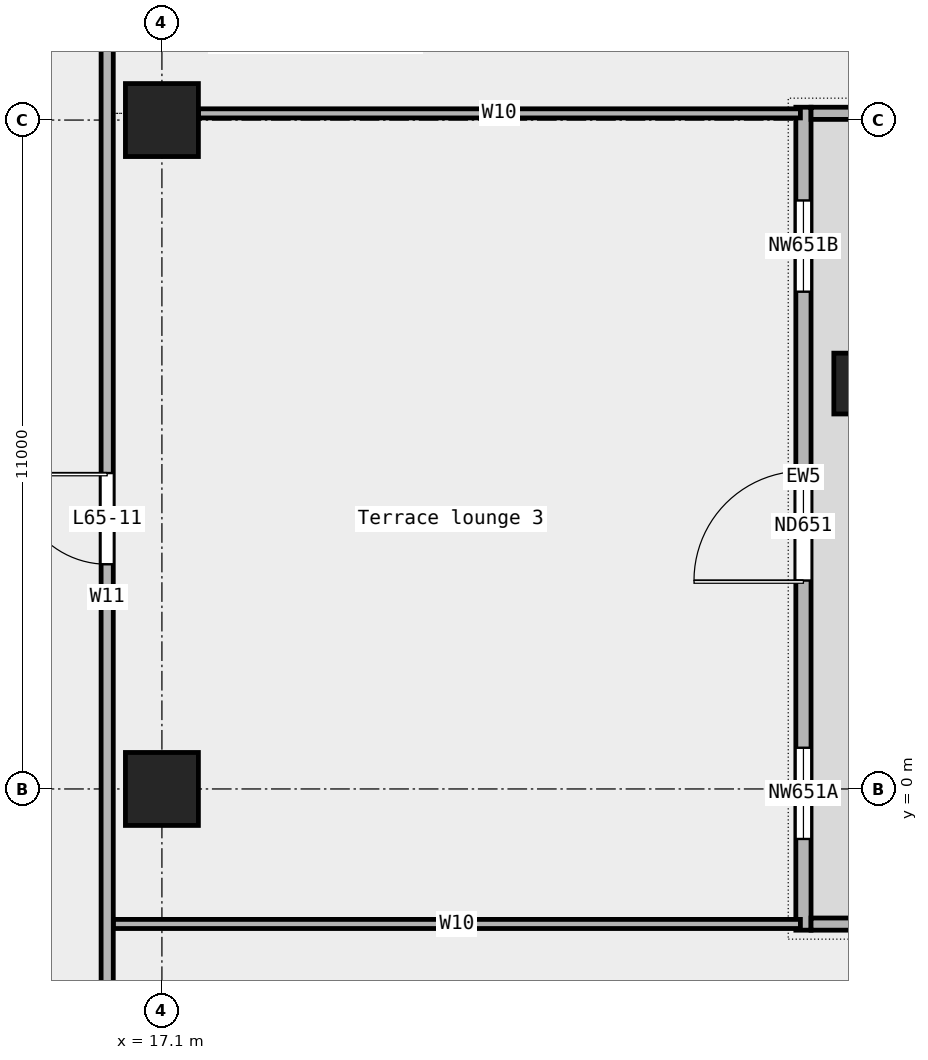
"""IFC4 building model, lengths in metres.
Left out: names, types, materials, properties, quantities, classifications, styles, units other than length and angle.
Written with IfcOpenShell. Run it as: python <this file> out.ifc"""

import sys

from ifc_helpers import new_model, si_unit, direction, frame, frame_2d, origin, origin_2d, place, context, subcontext, project, spatial, rectangle, extrude, element, fill, save


model = new_model("IFC4")
c1 = context("Model", 3, precision=1e-05, world=origin(), true_north=direction((0.0, 1.0)))
c2 = subcontext(c1, "Body", "Model", "MODEL_VIEW")
j1 = project(units=[si_unit("LENGTHUNIT", "METRE"), si_unit("PLANEANGLEUNIT", "RADIAN")], contexts=[c1])
p1 = place(None, origin())
s1 = spatial("IfcSite", under=j1, at=p1, CompositionType="ELEMENT")
p2 = place(p1, origin())
s2 = spatial("IfcBuilding", under=s1, at=p2, CompositionType="ELEMENT")
p3 = place(p2, frame((0.0, 0.0, 299.4)))
s3 = spatial("IfcBuildingStorey", under=s2, at=p3, CompositionType="ELEMENT", Elevation=299.4)
p4 = place(p3, frame((28.65, 6.667, 0.0), z_axis=(0.0, 0.0, 1.0), x_axis=(1.0, 0.0, 0.0)))
e1 = element("IfcColumn", 1, at=p4, inside=s3, PredefinedType="COLUMN", context=c2, shape_type="SweptSolid", body=[
    extrude(rectangle(XDim=1.0, YDim=1.0, at=origin_2d()), origin(), (0.0, 0.0, 1.0), 3.6),
])
for number, where, z_axis, x_axis in (
    (2, (17.1, 0.0, 0.0), (0.0, 0.0, 1.0), (1.0, 0.0, 0.0)),
    (3, (17.1, 11.0, 0.0), (0.0, 0.0, 1.0), (1.0, 0.0, 0.0)),
):
    element("IfcColumn", number, at=place(p3, frame(where, z_axis=z_axis, x_axis=x_axis)), inside=s3, PredefinedType="COLUMN", context=c2, shape_type="SweptSolid", body=[
        extrude(rectangle(XDim=1.2, YDim=1.2, at=origin_2d()), origin(), (0.0, 0.0, 1.0), 3.6),
    ])
p5 = place(p3, frame((27.65, -2.322, 0.0), z_axis=(0.0, 0.0, 1.0), x_axis=(0.0, 1.0, 0.0)))
e4 = element("IfcWall", 4, at=p5, inside=s3, PredefinedType="STANDARD", context=c2, shape_type="SweptSolid", body=[
    extrude(rectangle(XDim=13.533, YDim=0.25, at=frame_2d((6.767, 0.0))), origin(), (0.0, 0.0, 1.0), 3.6),
])
p6 = place(p5, frame((1.5, 0.0, 0.45)))
e5 = element("IfcOpeningElement", 5, at=p6, cuts=e4, PredefinedType="OPENING", context=c2, shape_type="SweptSolid", body=[
    extrude(rectangle(XDim=1.5, YDim=2.4, at=frame_2d((0.75, 1.2))), frame((0.0, 0.137, 0.0), z_axis=(0.0, -1.0, 0.0), x_axis=(1.0, 0.0, 0.0)), (0.0, 0.0, 1.0), 0.274),
])
p7 = place(p5, frame((5.75, 0.0, 0.0)))
e6 = element("IfcOpeningElement", 6, at=p7, cuts=e4, PredefinedType="OPENING", context=c2, shape_type="SweptSolid", body=[
    extrude(rectangle(XDim=1.8, YDim=2.4, at=frame_2d((0.9, 1.2))), frame((0.0, 0.137, 0.0), z_axis=(0.0, -1.0, 0.0), x_axis=(1.0, 0.0, 0.0)), (0.0, 0.0, 1.0), 0.274),
])
p8 = place(p5, frame((10.5, 0.0, 0.45)))
e7 = element("IfcOpeningElement", 7, at=p8, cuts=e4, PredefinedType="OPENING", context=c2, shape_type="SweptSolid", body=[
    extrude(rectangle(XDim=1.5, YDim=2.4, at=frame_2d((0.75, 1.2))), frame((0.0, 0.137, 0.0), z_axis=(0.0, -1.0, 0.0), x_axis=(1.0, 0.0, 0.0)), (0.0, 0.0, 1.0), 0.274),
])
for number, where, z_axis, x_axis in (
    (8, (29.65, -2.222, 0.0), (0.0, 0.0, 1.0), (-1.0, 0.0, 0.0)),
    (9, (29.65, 11.111, 0.0), (0.0, 0.0, 1.0), (-1.0, 0.0, 0.0)),
):
    element("IfcWall", number, at=place(p3, frame(where, z_axis=z_axis, x_axis=x_axis)), inside=s3, PredefinedType="STANDARD", context=c2, shape_type="SweptSolid", body=[
        extrude(rectangle(XDim=1.875, YDim=0.2, at=frame_2d((0.938, 0.0))), origin(), (0.0, 0.0, 1.0), 3.6),
    ])
p9 = place(p3, frame((16.3, -2.22, 0.0), z_axis=(0.0, 0.0, 1.0), x_axis=(1.0, 0.0, 0.0)))
e10 = element("IfcWall", 10, at=p9, inside=s3, PredefinedType="PARTITIONING", context=c2, shape_type="SweptSolid", body=[
    extrude(rectangle(XDim=11.3, YDim=0.15, at=frame_2d((5.65, 0.0))), origin(), (0.0, 0.0, 1.0), 3.6),
])
p10 = place(p3, frame((17.7, 11.11, 0.0), z_axis=(0.0, 0.0, 1.0), x_axis=(1.0, 0.0, 0.0)))
e11 = element("IfcWall", 11, at=p10, inside=s3, PredefinedType="PARTITIONING", context=c2, shape_type="SweptSolid", body=[
    extrude(rectangle(XDim=9.9, YDim=0.15, at=frame_2d((4.95, 0.0))), origin(), (0.0, 0.0, 1.0), 3.6),
])
p11 = place(p3, frame((16.2, -7.1, 0.0), z_axis=(0.0, 0.0, 1.0), x_axis=(0.0, 1.0, 0.0)))
e12 = element("IfcWall", 12, at=p11, inside=s3, PredefinedType="PARTITIONING", context=c2, shape_type="SweptSolid", body=[
    extrude(rectangle(XDim=20.5, YDim=0.2, at=frame_2d((10.25, 0.0))), origin(), (0.0, 0.0, 1.0), 3.6),
])
p12 = place(p11, frame((10.795, 0.0, 0.0)))
e13 = element("IfcOpeningElement", 13, at=p12, cuts=e12, PredefinedType="OPENING", context=c2, shape_type="SweptSolid", body=[
    extrude(rectangle(XDim=1.5, YDim=2.1, at=frame_2d((0.75, 1.05))), frame((0.0, 0.112, 0.0), z_axis=(0.0, -1.0, 0.0), x_axis=(1.0, 0.0, 0.0)), (0.0, 0.0, 1.0), 0.224),
])
p13 = place(p6, origin())
e14 = element("IfcWindow", 14, at=p13, inside=s3, PartitioningType="SINGLE_PANEL", PredefinedType="WINDOW", context=c2, shape_type="SweptSolid", body=[
    extrude(rectangle(XDim=1.5, YDim=2.4, at=frame_2d((0.75, 1.2))), frame((0.0, 0.03, 0.0), z_axis=(0.0, -1.0, 0.0), x_axis=(1.0, 0.0, 0.0)), (0.0, 0.0, 1.0), 0.06),
])
fill(e5, e14)
p14 = place(p7, origin())
e15 = element("IfcDoor", 15, at=p14, inside=s3, OperationType="DOUBLE_DOOR_SINGLE_SWING", PredefinedType="DOOR", context=c2, shape_type="SweptSolid", body=[
    extrude(rectangle(XDim=1.8, YDim=2.4, at=frame_2d((0.9, 1.2))), frame((0.0, 0.025, 0.0), z_axis=(0.0, -1.0, 0.0), x_axis=(1.0, 0.0, 0.0)), (0.0, 0.0, 1.0), 0.05),
])
fill(e6, e15)
p15 = place(p8, origin())
e16 = element("IfcWindow", 16, at=p15, inside=s3, PartitioningType="SINGLE_PANEL", PredefinedType="WINDOW", context=c2, shape_type="SweptSolid", body=[
    extrude(rectangle(XDim=1.5, YDim=2.4, at=frame_2d((0.75, 1.2))), frame((0.0, 0.03, 0.0), z_axis=(0.0, -1.0, 0.0), x_axis=(1.0, 0.0, 0.0)), (0.0, 0.0, 1.0), 0.06),
])
fill(e7, e16)
p16 = place(p12, origin())
e17 = element("IfcDoor", 17, at=p16, inside=s3, OperationType="DOUBLE_DOOR_SINGLE_SWING", PredefinedType="DOOR", context=c2, shape_type="SweptSolid", body=[
    extrude(rectangle(XDim=1.5, YDim=2.1, at=frame_2d((0.75, 1.05))), frame((0.0, 0.025, 0.0), z_axis=(0.0, -1.0, 0.0), x_axis=(1.0, 0.0, 0.0)), (0.0, 0.0, 1.0), 0.05),
])
fill(e13, e17)
save(model, sys.argv[1])
